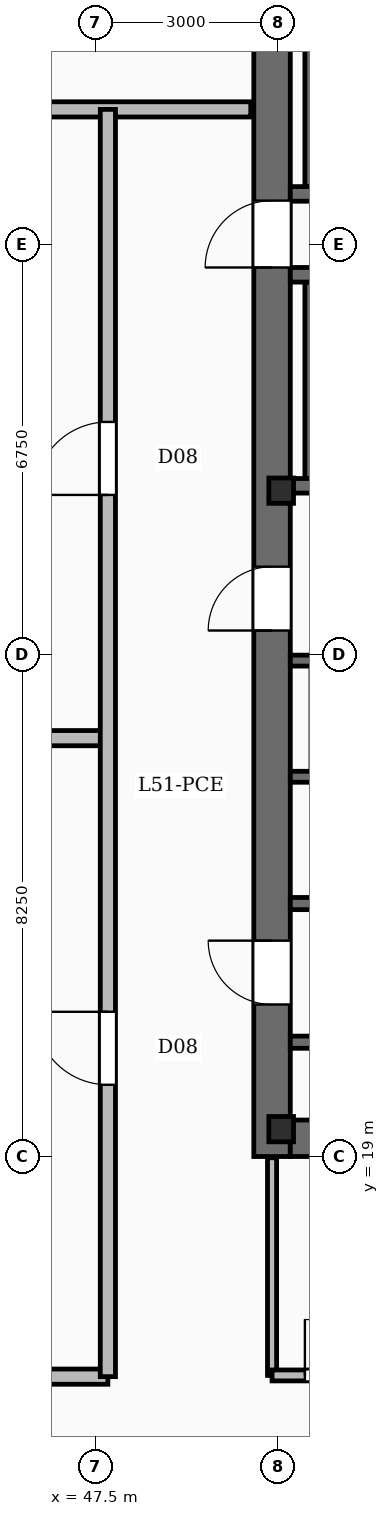
"""IFC4 building model, lengths in metres.
Left out: names, types, materials, properties, quantities, classifications, styles, units other than length and angle.
Written with IfcOpenShell. Run it as: python <this file> out.ifc"""

import sys

from ifc_helpers import new_model, si_unit, direction, frame, frame_2d, origin, origin_2d, place, context, subcontext, project, spatial, rectangle, i_section, extrude, element, fill, save


model = new_model("IFC4")
c1 = context("Model", 3, precision=1e-05, world=origin(), true_north=direction((0.0, 1.0)))
c2 = subcontext(c1, "Body", "Model", "MODEL_VIEW")
j1 = project(units=[si_unit("LENGTHUNIT", "METRE"), si_unit("PLANEANGLEUNIT", "RADIAN")], contexts=[c1])
p1 = place(None, origin())
s1 = spatial("IfcSite", under=j1, at=p1, CompositionType="ELEMENT")
p2 = place(p1, origin())
s2 = spatial("IfcBuilding", under=s1, at=p2, CompositionType="ELEMENT")
p3 = place(p2, frame((0.0, 0.0, 210.95)))
s3 = spatial("IfcBuildingStorey", under=s2, at=p3, CompositionType="ELEMENT", Elevation=210.95)
p4 = place(p3, frame((50.4, 19.0, -0.42), z_axis=(0.0, 0.0, 1.0), x_axis=(0.0, 1.0, 0.0)))
e1 = element("IfcWall", 1, at=p4, inside=s3, PredefinedType="SHEAR", context=c2, shape_type="SweptSolid", body=[
    extrude(rectangle(XDim=20.8, YDim=0.6, at=frame_2d((10.4, 0.0))), origin(), (0.0, 0.0, 1.0), 5.17),
])
p5 = place(p4, frame((2.5, 0.0, 0.42)))
e2 = element("IfcOpeningElement", 2, at=p5, cuts=e1, PredefinedType="OPENING", context=c2, shape_type="SweptSolid", body=[
    extrude(rectangle(XDim=1.05, YDim=2.15, at=frame_2d((0.525, 1.075))), frame((0.0, 0.31, 0.0), z_axis=(0.0, -1.0, 0.0), x_axis=(1.0, 0.0, 0.0)), (0.0, 0.0, 1.0), 0.62),
])
p6 = place(p4, frame((8.65, 0.0, 0.42)))
e3 = element("IfcOpeningElement", 3, at=p6, cuts=e1, PredefinedType="OPENING", context=c2, shape_type="SweptSolid", body=[
    extrude(rectangle(XDim=1.05, YDim=2.15, at=frame_2d((0.525, 1.075))), frame((0.0, 0.31, 0.0), z_axis=(0.0, -1.0, 0.0), x_axis=(1.0, 0.0, 0.0)), (0.0, 0.0, 1.0), 0.62),
])
p7 = place(p4, frame((14.62, 0.0, 0.42)))
e4 = element("IfcOpeningElement", 4, at=p7, cuts=e1, PredefinedType="OPENING", context=c2, shape_type="SweptSolid", body=[
    extrude(rectangle(XDim=1.1, YDim=2.15, at=frame_2d((0.55, 1.075))), frame((0.0, 0.31, 0.0), z_axis=(0.0, -1.0, 0.0), x_axis=(1.0, 0.0, 0.0)), (0.0, 0.0, 1.0), 0.62),
])
p8 = place(p3, frame((50.7, 19.3, -0.42), z_axis=(0.0, 0.0, 1.0), x_axis=(1.0, 0.0, 0.0)))
e5 = element("IfcWall", 5, at=p8, inside=s3, PredefinedType="SHEAR", context=c2, shape_type="SweptSolid", body=[
    extrude(rectangle(XDim=9.5, YDim=0.6, at=frame_2d((4.75, 0.0))), origin(), (0.0, 0.0, 1.0), 5.17),
])
for number, where, z_axis, x_axis in (
    (6, (50.55, 19.45, -0.42), (0.0, 0.0, 1.0), (1.0, 0.0, 0.0)),
    (7, (50.55, 29.95, -0.42), (0.0, 0.0, 1.0), (1.0, 0.0, 0.0)),
):
    element("IfcColumn", number, at=place(p3, frame(where, z_axis=z_axis, x_axis=x_axis)), inside=s3, PredefinedType="COLUMN", context=c2, shape_type="SweptSolid", body=[
        extrude(i_section(OverallWidth=0.406, OverallDepth=0.416, WebThickness=0.03, FlangeThickness=0.048, FilletRadius=0.02, at=origin_2d()), origin(), (0.0, 0.0, 1.0), 5.17),
    ])
p9 = place(p3, frame((60.2, 30.03, 0.0), z_axis=(0.0, 0.0, 1.0), x_axis=(-1.0, 0.0, 0.0)))
e8 = element("IfcWall", 8, at=p9, inside=s3, PredefinedType="SOLIDWALL", context=c2, shape_type="SweptSolid", body=[
    extrude(rectangle(XDim=9.5, YDim=0.24, at=frame_2d((4.75, 0.0))), origin(), (0.0, 0.0, 1.0), 4.75),
])
p10 = place(p9, frame((7.68, 0.0, 0.0)))
e9 = element("IfcOpeningElement", 9, at=p10, cuts=e8, PredefinedType="OPENING", context=c2, shape_type="SweptSolid", body=[
    extrude(rectangle(XDim=1.1, YDim=2.15, at=frame_2d((0.55, 1.075))), frame((0.0, 0.13, 0.0), z_axis=(0.0, -1.0, 0.0), x_axis=(1.0, 0.0, 0.0)), (0.0, 0.0, 1.0), 0.26),
])
p11 = place(p3, frame((50.7, 33.5, 0.0), z_axis=(0.0, 0.0, 1.0), x_axis=(1.0, 0.0, 0.0)))
e10 = element("IfcWall", 10, at=p11, inside=s3, PredefinedType="SOLIDWALL", context=c2, shape_type="SweptSolid", body=[
    extrude(rectangle(XDim=9.5, YDim=0.24, at=frame_2d((4.75, 0.0))), origin(), (0.0, 0.0, 1.0), 4.75),
])
p12 = place(p3, frame((51.06, 30.15, 0.0), z_axis=(0.0, 0.0, 1.0), x_axis=(0.0, 1.0, 0.0)))
e11 = element("IfcWall", 11, at=p12, inside=s3, PredefinedType="SOLIDWALL", context=c2, shape_type="SweptSolid", body=[
    extrude(rectangle(XDim=3.23, YDim=0.24, at=frame_2d((1.615, 0.0))), origin(), (0.0, 0.0, 1.0), 4.75),
])
p13 = place(p3, frame((60.2, 34.83, 0.0), z_axis=(0.0, 0.0, 1.0), x_axis=(-1.0, 0.0, 0.0)))
e12 = element("IfcWall", 12, at=p13, inside=s3, PredefinedType="SOLIDWALL", context=c2, shape_type="SweptSolid", body=[
    extrude(rectangle(XDim=9.5, YDim=0.24, at=frame_2d((4.75, 0.0))), origin(), (0.0, 0.0, 1.0), 4.75),
])
p14 = place(p13, frame((7.72, 0.0, 0.0)))
e13 = element("IfcOpeningElement", 13, at=p14, cuts=e12, PredefinedType="OPENING", context=c2, shape_type="SweptSolid", body=[
    extrude(rectangle(XDim=1.1, YDim=2.15, at=frame_2d((0.55, 1.075))), frame((0.0, 0.13, 0.0), z_axis=(0.0, -1.0, 0.0), x_axis=(1.0, 0.0, 0.0)), (0.0, 0.0, 1.0), 0.26),
])
p15 = place(p3, frame((51.06, 34.95, 0.0), z_axis=(0.0, 0.0, 1.0), x_axis=(0.0, 1.0, 0.0)))
e14 = element("IfcWall", 14, at=p15, inside=s3, PredefinedType="SOLIDWALL", context=c2, shape_type="SweptSolid", body=[
    extrude(rectangle(XDim=3.15, YDim=0.24, at=frame_2d((1.575, 0.0))), origin(), (0.0, 0.0, 1.0), 4.75),
])
p16 = place(p3, frame((50.7, 27.155, 0.0), z_axis=(0.0, 0.0, 1.0), x_axis=(1.0, 0.0, 0.0)))
e15 = element("IfcWall", 15, at=p16, inside=s3, PredefinedType="SOLIDWALL", context=c2, shape_type="SweptSolid", body=[
    extrude(rectangle(XDim=3.165, YDim=0.18, at=frame_2d((1.583, 0.0))), origin(), (0.0, 0.0, 1.0), 4.75),
])
p17 = place(p16, frame((1.085, 0.0, 0.0)))
e16 = element("IfcOpeningElement", 16, at=p17, cuts=e15, PredefinedType="OPENING", context=c2, shape_type="SweptSolid", body=[
    extrude(rectangle(XDim=1.35, YDim=2.3, at=frame_2d((0.675, 1.15))), frame((0.0, 0.1, 0.0), z_axis=(0.0, -1.0, 0.0), x_axis=(1.0, 0.0, 0.0)), (0.0, 0.0, 1.0), 0.2),
])
p18 = place(p3, frame((50.7, 25.245, 0.0), z_axis=(0.0, 0.0, 1.0), x_axis=(1.0, 0.0, 0.0)))
e17 = element("IfcWall", 17, at=p18, inside=s3, PredefinedType="SOLIDWALL", context=c2, shape_type="SweptSolid", body=[
    extrude(rectangle(XDim=3.165, YDim=0.18, at=frame_2d((1.583, 0.0))), origin(), (0.0, 0.0, 1.0), 4.75),
])
p19 = place(p3, frame((50.7, 20.88, 0.0), z_axis=(0.0, 0.0, 1.0), x_axis=(1.0, 0.0, 0.0)))
e18 = element("IfcWall", 18, at=p19, inside=s3, PredefinedType="SOLIDWALL", context=c2, shape_type="SweptSolid", body=[
    extrude(rectangle(XDim=9.5, YDim=0.2, at=frame_2d((4.75, 0.0))), origin(), (0.0, 0.0, 1.0), 3.81),
])
p20 = place(p19, frame((1.4, 0.0, 0.0)))
e19 = element("IfcOpeningElement", 19, at=p20, cuts=e18, PredefinedType="OPENING", context=c2, shape_type="SweptSolid", body=[
    extrude(rectangle(XDim=1.05, YDim=2.15, at=frame_2d((0.525, 1.075))), frame((0.0, 0.11, 0.0), z_axis=(0.0, -1.0, 0.0), x_axis=(1.0, 0.0, 0.0)), (0.0, 0.0, 1.0), 0.22),
])
p21 = place(p19, frame((5.5, 0.0, 0.0)))
e20 = element("IfcOpeningElement", 20, at=p21, cuts=e18, PredefinedType="OPENING", context=c2, shape_type="SweptSolid", body=[
    extrude(rectangle(XDim=1.05, YDim=2.15, at=frame_2d((0.525, 1.075))), frame((0.0, 0.11, 0.0), z_axis=(0.0, -1.0, 0.0), x_axis=(1.0, 0.0, 0.0)), (0.0, 0.0, 1.0), 0.22),
])
p22 = place(p3, frame((50.7, 23.16, 0.0), z_axis=(0.0, 0.0, 1.0), x_axis=(1.0, 0.0, 0.0)))
e21 = element("IfcWall", 21, at=p22, inside=s3, PredefinedType="SOLIDWALL", context=c2, shape_type="SweptSolid", body=[
    extrude(rectangle(XDim=3.18, YDim=0.2, at=frame_2d((1.59, 0.0))), origin(), (0.0, 0.0, 1.0), 3.81),
])
p23 = place(p22, frame((0.55, 0.0, 0.0)))
e22 = element("IfcOpeningElement", 22, at=p23, cuts=e21, PredefinedType="OPENING", context=c2, shape_type="SweptSolid", body=[
    extrude(rectangle(XDim=0.86, YDim=2.05, at=frame_2d((0.43, 1.025))), frame((0.0, 0.11, 0.0), z_axis=(0.0, -1.0, 0.0), x_axis=(1.0, 0.0, 0.0)), (0.0, 0.0, 1.0), 0.22),
])
p24 = place(p3, frame((50.4, 15.4, 0.0), z_axis=(0.0, 0.0, 1.0), x_axis=(1.0, 0.0, 0.0)))
e23 = element("IfcWall", 23, at=p24, inside=s3, PredefinedType="SOLIDWALL", context=c2, shape_type="SweptSolid", body=[
    extrude(rectangle(XDim=10.0, YDim=0.18, at=frame_2d((5.0, 0.0))), origin(), (0.0, 0.0, 1.0), 3.81),
])
p25 = place(p24, frame((0.54, 0.0, 0.0)))
e24 = element("IfcOpeningElement", 24, at=p25, cuts=e23, PredefinedType="OPENING", context=c2, shape_type="SweptSolid", body=[
    extrude(rectangle(XDim=0.92, YDim=2.1, at=frame_2d((0.46, 1.05))), frame((0.0, 0.1, 0.0), z_axis=(0.0, -1.0, 0.0), x_axis=(1.0, 0.0, 0.0)), (0.0, 0.0, 1.0), 0.2),
])
p26 = place(p24, frame((2.54, 0.0, 0.0)))
e25 = element("IfcOpeningElement", 25, at=p26, cuts=e23, PredefinedType="OPENING", context=c2, shape_type="SweptSolid", body=[
    extrude(rectangle(XDim=0.92, YDim=2.1, at=frame_2d((0.46, 1.05))), frame((0.0, 0.1, 0.0), z_axis=(0.0, -1.0, 0.0), x_axis=(1.0, 0.0, 0.0)), (0.0, 0.0, 1.0), 0.2),
])
p27 = place(p24, frame((4.54, 0.0, 0.0)))
e26 = element("IfcOpeningElement", 26, at=p27, cuts=e23, PredefinedType="OPENING", context=c2, shape_type="SweptSolid", body=[
    extrude(rectangle(XDim=0.92, YDim=2.1, at=frame_2d((0.46, 1.05))), frame((0.0, 0.1, 0.0), z_axis=(0.0, -1.0, 0.0), x_axis=(1.0, 0.0, 0.0)), (0.0, 0.0, 1.0), 0.2),
])
p28 = place(p24, frame((6.54, 0.0, 0.0)))
e27 = element("IfcOpeningElement", 27, at=p28, cuts=e23, PredefinedType="OPENING", context=c2, shape_type="SweptSolid", body=[
    extrude(rectangle(XDim=0.92, YDim=2.1, at=frame_2d((0.46, 1.05))), frame((0.0, 0.1, 0.0), z_axis=(0.0, -1.0, 0.0), x_axis=(1.0, 0.0, 0.0)), (0.0, 0.0, 1.0), 0.2),
])
p29 = place(p24, frame((8.57, 0.0, 0.0)))
e28 = element("IfcOpeningElement", 28, at=p29, cuts=e23, PredefinedType="OPENING", context=c2, shape_type="SweptSolid", body=[
    extrude(rectangle(XDim=0.86, YDim=2.05, at=frame_2d((0.43, 1.025))), frame((0.0, 0.1, 0.0), z_axis=(0.0, -1.0, 0.0), x_axis=(1.0, 0.0, 0.0)), (0.0, 0.0, 1.0), 0.2),
])
p30 = place(p3, frame((50.4, 15.4, 0.0), z_axis=(0.0, 0.0, 1.0), x_axis=(0.0, 1.0, 0.0)))
e29 = element("IfcWall", 29, at=p30, inside=s3, PredefinedType="PARTITIONING", context=c2, shape_type="SweptSolid", body=[
    extrude(rectangle(XDim=3.58, YDim=0.15, at=frame_2d((1.79, 0.0))), origin(), (0.0, 0.0, 1.0), 2.8),
])
for number, where, z_axis, x_axis in (
    (30, (27.2, 25.88, 0.0), (0.0, 0.0, 1.0), (1.0, 0.0, 0.0)),
    (31, (27.2, 15.38, 0.0), (0.0, 0.0, 1.0), (1.0, 0.0, 0.0)),
):
    element("IfcWall", number, at=place(p3, frame(where, z_axis=z_axis, x_axis=x_axis)), inside=s3, PredefinedType="SOLIDWALL", context=c2, shape_type="SweptSolid", body=[
        extrude(rectangle(XDim=20.5, YDim=0.25, at=frame_2d((10.25, 0.0))), origin(), (0.0, 0.0, 1.0), 3.81),
    ])
p31 = place(p3, frame((24.85, 36.22, 0.0), z_axis=(0.0, 0.0, 1.0), x_axis=(1.0, 0.0, 0.0)))
e32 = element("IfcWall", 32, at=p31, inside=s3, PredefinedType="SOLIDWALL", context=c2, shape_type="SweptSolid", body=[
    extrude(rectangle(XDim=25.2, YDim=0.25, at=frame_2d((12.6, 0.0))), origin(), (0.0, 0.0, 1.0), 3.81),
])
p32 = place(p31, frame((0.55, 0.0, 0.0)))
e33 = element("IfcOpeningElement", 33, at=p32, cuts=e32, PredefinedType="OPENING", context=c2, shape_type="SweptSolid", body=[
    extrude(rectangle(XDim=1.2, YDim=2.2, at=frame_2d((0.6, 1.1))), frame((0.0, 0.135, 0.0), z_axis=(0.0, -1.0, 0.0), x_axis=(1.0, 0.0, 0.0)), (0.0, 0.0, 1.0), 0.27),
])
p33 = place(p3, frame((47.7, 15.38, 0.0), z_axis=(0.0, 0.0, 1.0), x_axis=(0.0, 1.0, 0.0)))
e34 = element("IfcWall", 34, at=p33, inside=s3, PredefinedType="SOLIDWALL", context=c2, shape_type="SweptSolid", body=[
    extrude(rectangle(XDim=20.84, YDim=0.25, at=frame_2d((10.42, 0.0))), origin(), (0.0, 0.0, 1.0), 3.81),
])
p34 = place(p33, frame((4.8, 0.0, 0.0)))
e35 = element("IfcOpeningElement", 35, at=p34, cuts=e34, PredefinedType="OPENING", context=c2, shape_type="SweptSolid", body=[
    extrude(rectangle(XDim=1.2, YDim=2.2, at=frame_2d((0.6, 1.1))), frame((0.0, 0.135, 0.0), z_axis=(0.0, -1.0, 0.0), x_axis=(1.0, 0.0, 0.0)), (0.0, 0.0, 1.0), 0.27),
])
p35 = place(p33, frame((14.5, 0.0, 0.0)))
e36 = element("IfcOpeningElement", 36, at=p35, cuts=e34, PredefinedType="OPENING", context=c2, shape_type="SweptSolid", body=[
    extrude(rectangle(XDim=1.2, YDim=2.2, at=frame_2d((0.6, 1.1))), frame((0.0, 0.135, 0.0), z_axis=(0.0, -1.0, 0.0), x_axis=(1.0, 0.0, 0.0)), (0.0, 0.0, 1.0), 0.27),
])
p36 = place(p5, origin())
e37 = element("IfcDoor", 37, at=p36, inside=s3, OperationType="SINGLE_SWING_RIGHT", PredefinedType="DOOR", context=c2, shape_type="SweptSolid", body=[
    extrude(rectangle(XDim=1.05, YDim=2.15, at=frame_2d((0.525, 1.075))), frame((0.0, 0.025, 0.0), z_axis=(0.0, -1.0, 0.0), x_axis=(1.0, 0.0, 0.0)), (0.0, 0.0, 1.0), 0.05),
])
fill(e2, e37)
p37 = place(p6, origin())
e38 = element("IfcDoor", 38, at=p37, inside=s3, OperationType="SINGLE_SWING_LEFT", PredefinedType="DOOR", context=c2, shape_type="SweptSolid", body=[
    extrude(rectangle(XDim=1.05, YDim=2.15, at=frame_2d((0.525, 1.075))), frame((0.0, 0.025, 0.0), z_axis=(0.0, -1.0, 0.0), x_axis=(1.0, 0.0, 0.0)), (0.0, 0.0, 1.0), 0.05),
])
fill(e3, e38)
p38 = place(p7, origin())
e39 = element("IfcDoor", 39, at=p38, inside=s3, OperationType="SINGLE_SWING_LEFT", PredefinedType="DOOR", context=c2, shape_type="SweptSolid", body=[
    extrude(rectangle(XDim=1.1, YDim=2.15, at=frame_2d((0.55, 1.075))), frame((0.0, 0.025, 0.0), z_axis=(0.0, -1.0, 0.0), x_axis=(1.0, 0.0, 0.0)), (0.0, 0.0, 1.0), 0.05),
])
fill(e4, e39)
p39 = place(p25, origin())
e40 = element("IfcDoor", 40, at=p39, inside=s3, OperationType="SINGLE_SWING_LEFT", PredefinedType="DOOR", context=c2, shape_type="SweptSolid", body=[
    extrude(rectangle(XDim=0.92, YDim=2.1, at=frame_2d((0.46, 1.05))), frame((0.0, 0.025, 0.0), z_axis=(0.0, -1.0, 0.0), x_axis=(1.0, 0.0, 0.0)), (0.0, 0.0, 1.0), 0.05),
])
fill(e24, e40)
p40 = place(p34, origin())
e41 = element("IfcDoor", 41, at=p40, inside=s3, OperationType="SINGLE_SWING_RIGHT", PredefinedType="DOOR", context=c2, shape_type="SweptSolid", body=[
    extrude(rectangle(XDim=1.2, YDim=2.2, at=frame_2d((0.6, 1.1))), frame((0.0, 0.025, 0.0), z_axis=(0.0, -1.0, 0.0), x_axis=(1.0, 0.0, 0.0)), (0.0, 0.0, 1.0), 0.05),
])
fill(e35, e41)
p41 = place(p35, origin())
e42 = element("IfcDoor", 42, at=p41, inside=s3, OperationType="SINGLE_SWING_LEFT", PredefinedType="DOOR", context=c2, shape_type="SweptSolid", body=[
    extrude(rectangle(XDim=1.2, YDim=2.2, at=frame_2d((0.6, 1.1))), frame((0.0, 0.025, 0.0), z_axis=(0.0, -1.0, 0.0), x_axis=(1.0, 0.0, 0.0)), (0.0, 0.0, 1.0), 0.05),
])
fill(e36, e42)
save(model, sys.argv[1])
